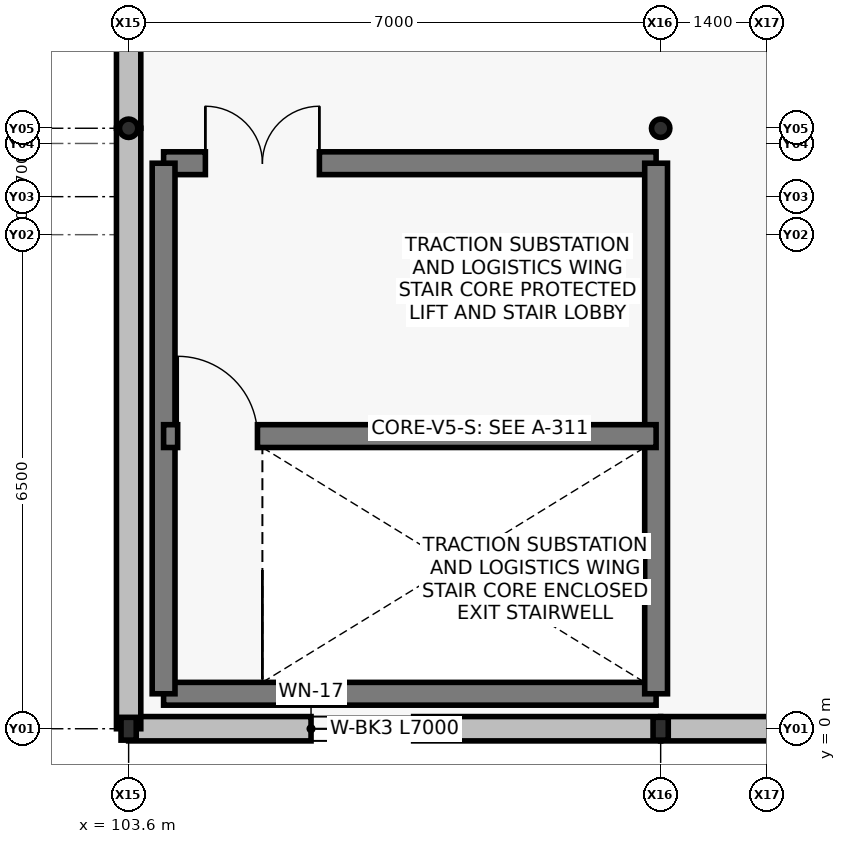
"""IFC4 building model, lengths in metres.
Left out: names, types, materials, properties, quantities, classifications, styles, units other than length and angle.
Written with IfcOpenShell. Run it as: python <this file> out.ifc"""

import sys

from ifc_helpers import new_model, si_unit, direction, frame, frame_2d, origin, origin_2d, place, context, subcontext, project, spatial, rectangle, hollow_rectangle, hollow_circle, extrude, element, fill, save


model = new_model("IFC4")
c1 = context("Model", 3, precision=1e-05, world=origin(), true_north=direction((0.0, 1.0)))
c2 = subcontext(c1, "Body", "Model", "MODEL_VIEW")
j1 = project(units=[si_unit("LENGTHUNIT", "METRE"), si_unit("PLANEANGLEUNIT", "RADIAN")], contexts=[c1])
p1 = place(None, origin())
s1 = spatial("IfcSite", under=j1, at=p1, CompositionType="ELEMENT")
p2 = place(p1, origin())
s2 = spatial("IfcBuilding", under=s1, at=p2, CompositionType="ELEMENT")
p3 = place(p2, frame((0.0, 0.0, 6.0)))
s3 = spatial("IfcBuildingStorey", under=s2, at=p3, CompositionType="ELEMENT", Elevation=6.0)
p4 = place(p3, frame((103.6, 0.0, 0.0), z_axis=(0.0, 0.0, 1.0), x_axis=(1.0, 0.0, 0.0)))
e1 = element("IfcColumn", 1, at=p4, inside=s3, PredefinedType="COLUMN", context=c2, shape_type="SweptSolid", body=[
    extrude(hollow_rectangle(XDim=0.2, YDim=0.3, WallThickness=0.009, at=origin_2d()), origin(), (0.0, 0.0, 1.0), 3.1),
])
p5 = place(p3, frame((103.6, 7.9, 0.0), z_axis=(0.0, 0.0, 1.0), x_axis=(1.0, 0.0, 0.0)))
e2 = element("IfcColumn", 2, at=p5, inside=s3, PredefinedType="COLUMN", context=c2, shape_type="SweptSolid", body=[
    extrude(hollow_circle(Radius=0.121, WallThickness=0.009, at=origin_2d()), origin(), (0.0, 0.0, 1.0), 2.9),
])
p6 = place(p3, frame((110.6, 0.0, 0.0), z_axis=(0.0, 0.0, 1.0), x_axis=(1.0, 0.0, 0.0)))
e3 = element("IfcColumn", 3, at=p6, inside=s3, PredefinedType="COLUMN", context=c2, shape_type="SweptSolid", body=[
    extrude(hollow_rectangle(XDim=0.2, YDim=0.3, WallThickness=0.009, at=origin_2d()), origin(), (0.0, 0.0, 1.0), 3.1),
])
p7 = place(p3, frame((110.6, 7.9, 0.0), z_axis=(0.0, 0.0, 1.0), x_axis=(1.0, 0.0, 0.0)))
e4 = element("IfcColumn", 4, at=p7, inside=s3, PredefinedType="COLUMN", context=c2, shape_type="SweptSolid", body=[
    extrude(hollow_circle(Radius=0.121, WallThickness=0.009, at=origin_2d()), origin(), (0.0, 0.0, 1.0), 2.9),
])
p8 = place(p3, frame((103.6, 0.0, 0.0), z_axis=(0.0, 0.0, 1.0), x_axis=(1.0, 0.0, 0.0)))
e5 = element("IfcWall", 5, at=p8, inside=s3, PredefinedType="SOLIDWALL", context=c2, shape_type="SweptSolid", body=[
    extrude(rectangle(XDim=7.0, YDim=0.32, at=frame_2d((3.5, 0.0))), origin(), (0.0, 0.0, 1.0), 2.38),
])
p9 = place(p8, frame((2.4, 0.0, 0.6)))
e6 = element("IfcOpeningElement", 6, at=p9, cuts=e5, PredefinedType="OPENING", context=c2, shape_type="SweptSolid", body=[
    extrude(rectangle(XDim=1.35, YDim=1.65, at=frame_2d((0.675, 0.825))), frame((0.0, 0.17, 0.0), z_axis=(0.0, -1.0, 0.0), x_axis=(1.0, 0.0, 0.0)), (0.0, 0.0, 1.0), 0.34),
])
p10 = place(p3, frame((110.6, 0.0, 0.0), z_axis=(0.0, 0.0, 1.0), x_axis=(1.0, 0.0, 0.0)))
e7 = element("IfcWall", 7, at=p10, inside=s3, PredefinedType="SOLIDWALL", context=c2, shape_type="SweptSolid", body=[
    extrude(rectangle(XDim=7.0, YDim=0.32, at=frame_2d((3.5, 0.0))), origin(), (0.0, 0.0, 1.0), 2.38),
])
p11 = place(p10, frame((2.4, 0.0, 0.6)))
e8 = element("IfcOpeningElement", 8, at=p11, cuts=e7, PredefinedType="OPENING", context=c2, shape_type="SweptSolid", body=[
    extrude(rectangle(XDim=1.35, YDim=1.65, at=frame_2d((0.675, 0.825))), frame((0.0, 0.17, 0.0), z_axis=(0.0, -1.0, 0.0), x_axis=(1.0, 0.0, 0.0)), (0.0, 0.0, 1.0), 0.34),
])
for number, where, z_axis, x_axis in (
    (9, (103.6, 0.0, 0.0), (0.0, 0.0, 1.0), (0.0, 1.0, 0.0)),
    (10, (103.6, 7.9, 0.0), (0.0, 0.0, 1.0), (0.0, 1.0, 0.0)),
):
    element("IfcWall", number, at=place(p3, frame(where, z_axis=z_axis, x_axis=x_axis)), inside=s3, PredefinedType="SOLIDWALL", context=c2, shape_type="SweptSolid", body=[
        extrude(rectangle(XDim=7.9, YDim=0.32, at=frame_2d((3.95, 0.0))), origin(), (0.0, 0.0, 1.0), 2.38),
    ])
p12 = place(p3, frame((104.06, 0.46, 0.0), z_axis=(0.0, 0.0, 1.0), x_axis=(1.0, 0.0, 0.0)))
e11 = element("IfcWall", 11, at=p12, inside=s3, PredefinedType="SHEAR", context=c2, shape_type="SweptSolid", body=[
    extrude(rectangle(XDim=6.48, YDim=0.3, at=frame_2d((3.24, 0.0))), origin(), (0.0, 0.0, 1.0), 2.38),
])
p13 = place(p3, frame((104.06, 7.44, 0.0), z_axis=(0.0, 0.0, 1.0), x_axis=(1.0, 0.0, 0.0)))
e12 = element("IfcWall", 12, at=p13, inside=s3, PredefinedType="SHEAR", context=c2, shape_type="SweptSolid", body=[
    extrude(rectangle(XDim=6.48, YDim=0.3, at=frame_2d((3.24, 0.0))), origin(), (0.0, 0.0, 1.0), 2.38),
])
p14 = place(p13, frame((0.55, 0.0, 0.0)))
e13 = element("IfcOpeningElement", 13, at=p14, cuts=e12, PredefinedType="OPENING", context=c2, shape_type="SweptSolid", body=[
    extrude(rectangle(XDim=1.5, YDim=2.2, at=frame_2d((0.75, 1.1))), frame((0.0, 0.16, 0.0), z_axis=(0.0, -1.0, 0.0), x_axis=(1.0, 0.0, 0.0)), (0.0, 0.0, 1.0), 0.32),
])
for number, where, z_axis, x_axis in (
    (14, (104.06, 0.46, 0.0), (0.0, 0.0, 1.0), (0.0, 1.0, 0.0)),
    (15, (110.54, 0.46, 0.0), (0.0, 0.0, 1.0), (0.0, 1.0, 0.0)),
):
    element("IfcWall", number, at=place(p3, frame(where, z_axis=z_axis, x_axis=x_axis)), inside=s3, PredefinedType="SHEAR", context=c2, shape_type="SweptSolid", body=[
        extrude(rectangle(XDim=6.98, YDim=0.3, at=frame_2d((3.49, 0.0))), origin(), (0.0, 0.0, 1.0), 2.38),
    ])
p15 = place(p3, frame((104.06, 3.85, 0.0), z_axis=(0.0, 0.0, 1.0), x_axis=(1.0, 0.0, 0.0)))
e16 = element("IfcWall", 16, at=p15, inside=s3, PredefinedType="SHEAR", context=c2, shape_type="SweptSolid", body=[
    extrude(rectangle(XDim=6.48, YDim=0.3, at=frame_2d((3.24, 0.0))), origin(), (0.0, 0.0, 1.0), 2.38),
])
p16 = place(p15, frame((0.185, 0.0, 0.0)))
e17 = element("IfcOpeningElement", 17, at=p16, cuts=e16, PredefinedType="OPENING", context=c2, shape_type="SweptSolid", body=[
    extrude(rectangle(XDim=1.05, YDim=2.15, at=frame_2d((0.525, 1.075))), frame((0.0, 0.16, 0.0), z_axis=(0.0, -1.0, 0.0), x_axis=(1.0, 0.0, 0.0)), (0.0, 0.0, 1.0), 0.32),
])
p17 = place(p9, origin())
e18 = element("IfcWindow", 18, at=p17, inside=s3, PartitioningType="SINGLE_PANEL", PredefinedType="WINDOW", context=c2, shape_type="SweptSolid", body=[
    extrude(rectangle(XDim=1.35, YDim=1.65, at=frame_2d((0.675, 0.825))), frame((0.0, 0.03, 0.0), z_axis=(0.0, -1.0, 0.0), x_axis=(1.0, 0.0, 0.0)), (0.0, 0.0, 1.0), 0.06),
])
fill(e6, e18)
p18 = place(p16, origin())
e19 = element("IfcDoor", 19, at=p18, inside=s3, OperationType="SINGLE_SWING_LEFT", PredefinedType="DOOR", context=c2, shape_type="SweptSolid", body=[
    extrude(rectangle(XDim=1.05, YDim=2.15, at=frame_2d((0.525, 1.075))), frame((0.0, 0.025, 0.0), z_axis=(0.0, -1.0, 0.0), x_axis=(1.0, 0.0, 0.0)), (0.0, 0.0, 1.0), 0.05),
])
fill(e17, e19)
p19 = place(p14, origin())
e20 = element("IfcDoor", 20, at=p19, inside=s3, OperationType="DOUBLE_DOOR_SINGLE_SWING", PredefinedType="DOOR", context=c2, shape_type="SweptSolid", body=[
    extrude(rectangle(XDim=1.5, YDim=2.2, at=frame_2d((0.75, 1.1))), frame((0.0, 0.025, 0.0), z_axis=(0.0, -1.0, 0.0), x_axis=(1.0, 0.0, 0.0)), (0.0, 0.0, 1.0), 0.05),
])
fill(e13, e20)
save(model, sys.argv[1])
